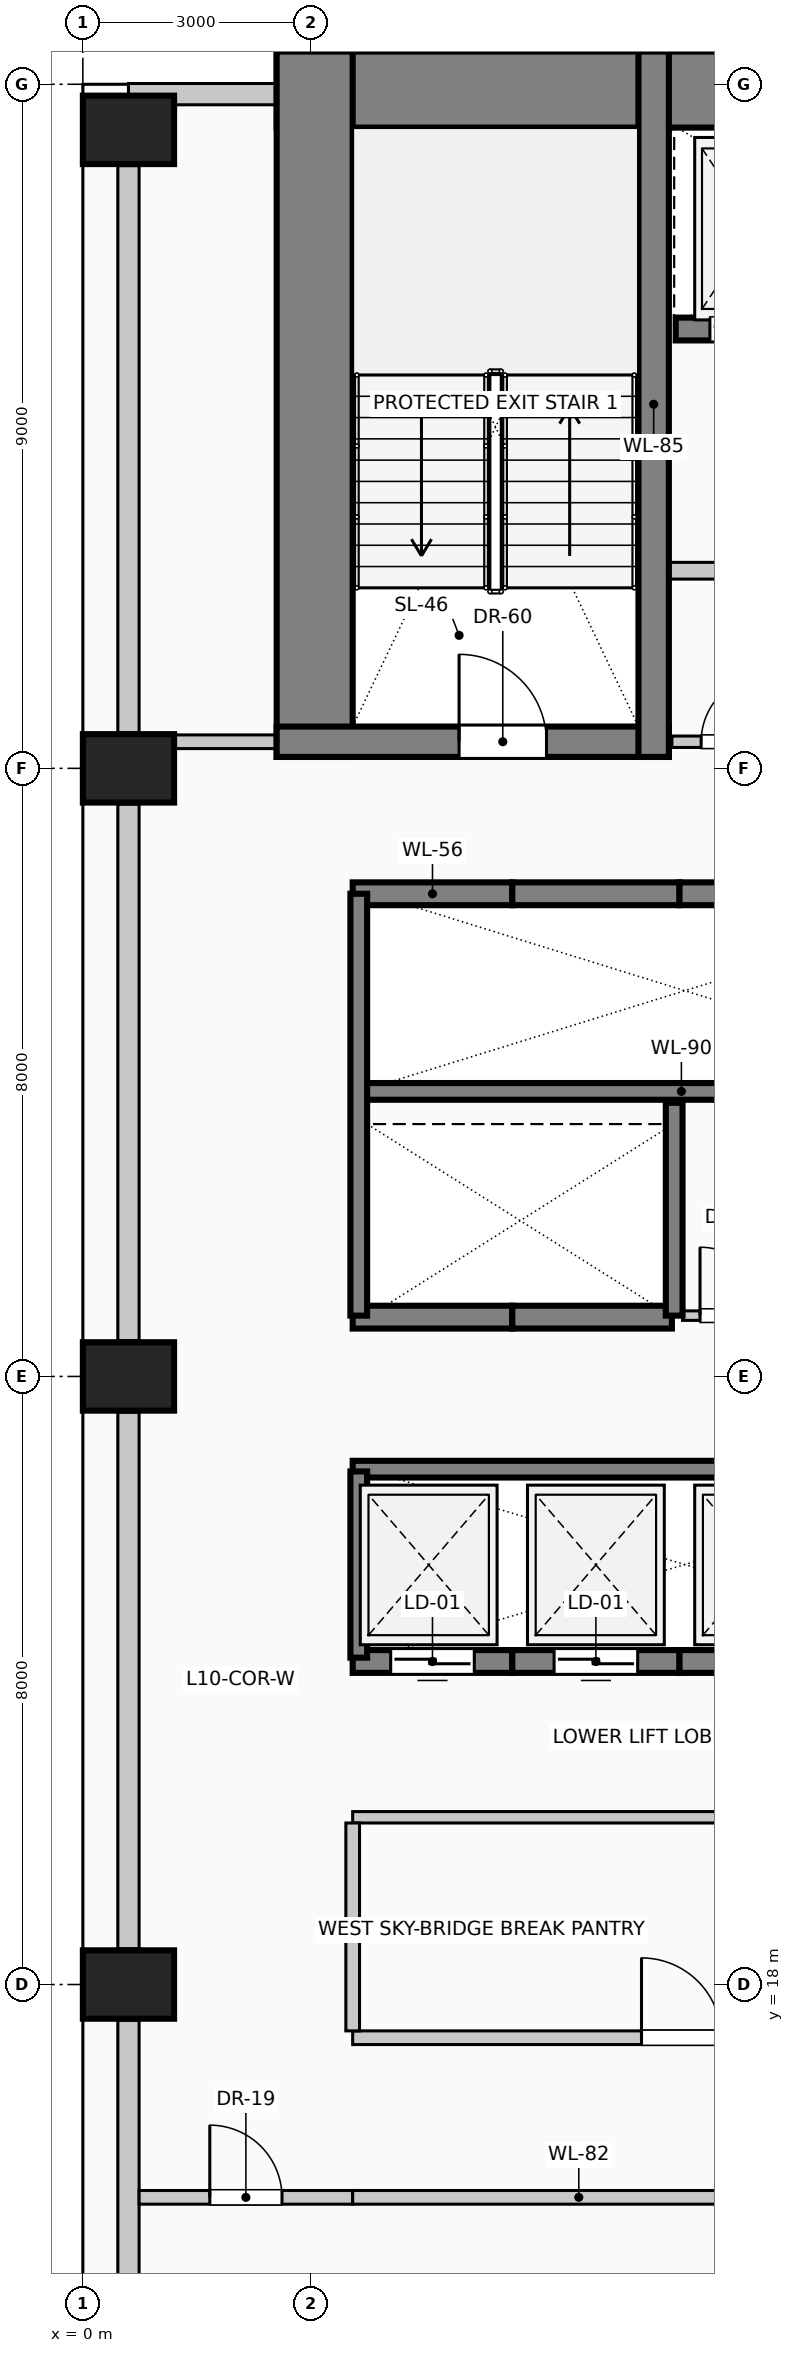
"""IFC4 building model, lengths in metres.
Left out: names, types, materials, properties, quantities, classifications, styles, units other than length and angle.
Written with IfcOpenShell. Run it as: python <this file> out.ifc"""

import sys

from ifc_helpers import new_model, si_unit, direction, frame, frame_2d, origin, origin_2d, place, context, subcontext, project, spatial, rectangle, extrude, element, fill, save


model = new_model("IFC4")
c1 = context("Model", 3, precision=1e-05, world=origin(), true_north=direction((0.0, 1.0)))
c2 = subcontext(c1, "Body", "Model", "MODEL_VIEW")
j1 = project(units=[si_unit("LENGTHUNIT", "METRE"), si_unit("PLANEANGLEUNIT", "RADIAN")], contexts=[c1])
p1 = place(None, origin())
s1 = spatial("IfcSite", under=j1, at=p1, CompositionType="ELEMENT")
p2 = place(p1, origin())
s2 = spatial("IfcBuilding", under=s1, at=p2, CompositionType="ELEMENT")
p3 = place(p2, frame((0.0, 0.0, 42.6)))
s3 = spatial("IfcBuildingStorey", under=s2, at=p3, CompositionType="ELEMENT", Elevation=42.6)
p4 = place(p3, frame((2.55, 42.93, 0.0), z_axis=(0.0, 0.0, 1.0), x_axis=(1.0, 0.0, 0.0)))
e1 = element("IfcWall", 1, at=p4, inside=s3, PredefinedType="SHEAR", context=c2, shape_type="SweptSolid", body=[
    extrude(rectangle(XDim=14.9, YDim=1.0, at=frame_2d((7.45, 0.0))), origin(), (0.0, 0.0, 1.0), 4.0),
])
p5 = place(p3, frame((3.05, 34.15, 0.0), z_axis=(0.0, 0.0, 1.0), x_axis=(0.0, 1.0, 0.0)))
e2 = element("IfcWall", 2, at=p5, inside=s3, PredefinedType="SHEAR", context=c2, shape_type="SweptSolid", body=[
    extrude(rectangle(XDim=9.28, YDim=1.0, at=frame_2d((4.64, 0.0))), origin(), (0.0, 0.0, 1.0), 4.0),
])
p6 = place(p3, frame((2.55, 34.35, 0.0), z_axis=(0.0, 0.0, 1.0), x_axis=(1.0, 0.0, 0.0)))
e3 = element("IfcWall", 3, at=p6, inside=s3, PredefinedType="SHEAR", context=c2, shape_type="SweptSolid", body=[
    extrude(rectangle(XDim=5.16, YDim=0.4, at=frame_2d((2.58, 0.0))), origin(), (0.0, 0.0, 1.0), 4.0),
])
p7 = place(p6, frame((2.4, 0.0, 0.0)))
e4 = element("IfcOpeningElement", 4, at=p7, cuts=e3, PredefinedType="OPENING", context=c2, shape_type="SweptSolid", body=[
    extrude(rectangle(XDim=1.15, YDim=2.2, at=frame_2d((0.575, 1.1))), frame((0.0, 0.21, 0.0), z_axis=(0.0, -1.0, 0.0), x_axis=(1.0, 0.0, 0.0)), (0.0, 0.0, 1.0), 0.42),
])
p8 = place(p3, frame((7.51, 34.15, 0.0), z_axis=(0.0, 0.0, 1.0), x_axis=(0.0, 1.0, 0.0)))
e5 = element("IfcWall", 5, at=p8, inside=s3, PredefinedType="SHEAR", context=c2, shape_type="SweptSolid", body=[
    extrude(rectangle(XDim=9.28, YDim=0.4, at=frame_2d((4.64, 0.0))), origin(), (0.0, 0.0, 1.0), 4.0),
])
for number, where, z_axis, x_axis in (
    (6, (0.6, 18.0, 0.0), (0.0, 0.0, 1.0), (0.0, 1.0, 0.0)),
    (7, (0.6, 26.0, 0.0), (0.0, 0.0, 1.0), (0.0, 1.0, 0.0)),
    (8, (0.6, 34.0, 0.0), (0.0, 0.0, 1.0), (0.0, 1.0, 0.0)),
    (9, (0.6, 42.4, 0.0), (0.0, 0.0, 1.0), (0.0, 1.0, 0.0)),
):
    element("IfcColumn", number, at=place(p3, frame(where, z_axis=z_axis, x_axis=x_axis)), inside=s3, PredefinedType="COLUMN", context=c2, shape_type="SweptSolid", body=[
        extrude(rectangle(XDim=0.9, YDim=1.2, at=origin_2d()), origin(), (0.0, 0.0, 1.0), 4.0),
    ])
for number, where, z_axis, x_axis in (
    (10, (0.6, 10.47, 0.0), (0.0, 0.0, 1.0), (0.0, 1.0, 0.0)),
    (11, (0.6, 18.47, 0.0), (0.0, 0.0, 1.0), (0.0, 1.0, 0.0)),
    (12, (0.6, 26.47, 0.0), (0.0, 0.0, 1.0), (0.0, 1.0, 0.0)),
):
    element("IfcWall", number, at=place(p3, frame(where, z_axis=z_axis, x_axis=x_axis)), inside=s3, PredefinedType="SOLIDWALL", context=c2, shape_type="SweptSolid", body=[
        extrude(rectangle(XDim=7.06, YDim=0.28, at=frame_2d((3.53, 0.0))), origin(), (0.0, 0.0, 1.0), 2.85),
    ])
p9 = place(p3, frame((0.6, 34.47, 0.0), z_axis=(0.0, 0.0, 1.0), x_axis=(0.0, 1.0, 0.0)))
e13 = element("IfcWall", 13, at=p9, inside=s3, PredefinedType="SOLIDWALL", context=c2, shape_type="SweptSolid", body=[
    extrude(rectangle(XDim=7.46, YDim=0.28, at=frame_2d((3.73, 0.0))), origin(), (0.0, 0.0, 1.0), 2.85),
])
p10 = place(p3, frame((0.6, 42.87, 0.0), z_axis=(0.0, 0.0, 1.0), x_axis=(1.0, 0.0, 0.0)))
e14 = element("IfcWall", 14, at=p10, inside=s3, PredefinedType="SOLIDWALL", context=c2, shape_type="SweptSolid", body=[
    extrude(rectangle(XDim=1.945, YDim=0.28, at=frame_2d((0.972, 0.0))), origin(), (0.0, 0.0, 1.0), 3.7),
])
p11 = place(p3, frame((5.65, 22.25, 0.0), z_axis=(0.0, 0.0, 1.0), x_axis=(-1.0, 0.0, 0.0)))
e15 = element("IfcWall", 15, at=p11, inside=s3, PredefinedType="SOLIDWALL", context=c2, shape_type="SweptSolid", body=[
    extrude(rectangle(XDim=2.1, YDim=0.3, at=frame_2d((1.05, 0.0))), origin(), (0.0, 0.0, 1.0), 4.0),
])
p12 = place(p11, frame((0.5, 0.0, 0.0)))
e16 = element("IfcOpeningElement", 16, at=p12, cuts=e15, PredefinedType="OPENING", context=c2, shape_type="SweptSolid", body=[
    extrude(rectangle(XDim=1.1, YDim=2.2, at=frame_2d((0.55, 1.1))), frame((0.0, 0.16, 0.0), z_axis=(0.0, -1.0, 0.0), x_axis=(1.0, 0.0, 0.0)), (0.0, 0.0, 1.0), 0.32),
])
p13 = place(p3, frame((7.85, 22.25, 0.0), z_axis=(0.0, 0.0, 1.0), x_axis=(-1.0, 0.0, 0.0)))
e17 = element("IfcWall", 17, at=p13, inside=s3, PredefinedType="SOLIDWALL", context=c2, shape_type="SweptSolid", body=[
    extrude(rectangle(XDim=2.2, YDim=0.3, at=frame_2d((1.1, 0.0))), origin(), (0.0, 0.0, 1.0), 4.0),
])
p14 = place(p13, frame((0.55, 0.0, 0.0)))
e18 = element("IfcOpeningElement", 18, at=p14, cuts=e17, PredefinedType="OPENING", context=c2, shape_type="SweptSolid", body=[
    extrude(rectangle(XDim=1.1, YDim=2.2, at=frame_2d((0.55, 1.1))), frame((0.0, 0.16, 0.0), z_axis=(0.0, -1.0, 0.0), x_axis=(1.0, 0.0, 0.0)), (0.0, 0.0, 1.0), 0.32),
])
p15 = place(p3, frame((10.05, 22.25, 0.0), z_axis=(0.0, 0.0, 1.0), x_axis=(-1.0, 0.0, 0.0)))
e19 = element("IfcWall", 19, at=p15, inside=s3, PredefinedType="SOLIDWALL", context=c2, shape_type="SweptSolid", body=[
    extrude(rectangle(XDim=2.2, YDim=0.3, at=frame_2d((1.1, 0.0))), origin(), (0.0, 0.0, 1.0), 4.0),
])
p16 = place(p15, frame((0.55, 0.0, 0.0)))
e20 = element("IfcOpeningElement", 20, at=p16, cuts=e19, PredefinedType="OPENING", context=c2, shape_type="SweptSolid", body=[
    extrude(rectangle(XDim=1.1, YDim=2.2, at=frame_2d((0.55, 1.1))), frame((0.0, 0.16, 0.0), z_axis=(0.0, -1.0, 0.0), x_axis=(1.0, 0.0, 0.0)), (0.0, 0.0, 1.0), 0.32),
])
p17 = place(p3, frame((3.55, 32.35, 0.0), z_axis=(0.0, 0.0, 1.0), x_axis=(1.0, 0.0, 0.0)))
e21 = element("IfcWall", 21, at=p17, inside=s3, PredefinedType="SOLIDWALL", context=c2, shape_type="SweptSolid", body=[
    extrude(rectangle(XDim=2.1, YDim=0.3, at=frame_2d((1.05, 0.0))), origin(), (0.0, 0.0, 1.0), 4.0),
])
p18 = place(p3, frame((5.65, 32.35, 0.0), z_axis=(0.0, 0.0, 1.0), x_axis=(1.0, 0.0, 0.0)))
e22 = element("IfcWall", 22, at=p18, inside=s3, PredefinedType="SOLIDWALL", context=c2, shape_type="SweptSolid", body=[
    extrude(rectangle(XDim=2.2, YDim=0.3, at=frame_2d((1.1, 0.0))), origin(), (0.0, 0.0, 1.0), 4.0),
])
p19 = place(p3, frame((7.85, 32.35, 0.0), z_axis=(0.0, 0.0, 1.0), x_axis=(1.0, 0.0, 0.0)))
e23 = element("IfcWall", 23, at=p19, inside=s3, PredefinedType="SOLIDWALL", context=c2, shape_type="SweptSolid", body=[
    extrude(rectangle(XDim=2.2, YDim=0.3, at=frame_2d((1.1, 0.0))), origin(), (0.0, 0.0, 1.0), 4.0),
])
p20 = place(p3, frame((5.65, 26.78, 0.0), z_axis=(0.0, 0.0, 1.0), x_axis=(-1.0, 0.0, 0.0)))
e24 = element("IfcWall", 24, at=p20, inside=s3, PredefinedType="SOLIDWALL", context=c2, shape_type="SweptSolid", body=[
    extrude(rectangle(XDim=2.1, YDim=0.3, at=frame_2d((1.05, 0.0))), origin(), (0.0, 0.0, 1.0), 4.0),
])
p21 = place(p3, frame((7.75, 26.78, 0.0), z_axis=(0.0, 0.0, 1.0), x_axis=(-1.0, 0.0, 0.0)))
e25 = element("IfcWall", 25, at=p21, inside=s3, PredefinedType="SOLIDWALL", context=c2, shape_type="SweptSolid", body=[
    extrude(rectangle(XDim=2.1, YDim=0.3, at=frame_2d((1.05, 0.0))), origin(), (0.0, 0.0, 1.0), 4.0),
])
p22 = place(p3, frame((10.0, 39.78, 0.0), z_axis=(0.0, 0.0, 1.0), x_axis=(-1.0, 0.0, 0.0)))
e26 = element("IfcWall", 26, at=p22, inside=s3, PredefinedType="SOLIDWALL", context=c2, shape_type="SweptSolid", body=[
    extrude(rectangle(XDim=2.2, YDim=0.3, at=frame_2d((1.1, 0.0))), origin(), (0.0, 0.0, 1.0), 4.0),
])
p23 = place(p22, frame((0.45, 0.0, 0.0)))
e27 = element("IfcOpeningElement", 27, at=p23, cuts=e26, PredefinedType="OPENING", context=c2, shape_type="SweptSolid", body=[
    extrude(rectangle(XDim=1.3, YDim=2.25, at=frame_2d((0.65, 1.125))), frame((0.0, 0.16, 0.0), z_axis=(0.0, -1.0, 0.0), x_axis=(1.0, 0.0, 0.0)), (0.0, 0.0, 1.0), 0.32),
])
p24 = place(p3, frame((3.55, 29.75, 0.0), z_axis=(0.0, 0.0, 1.0), x_axis=(1.0, 0.0, 0.0)))
e28 = element("IfcWall", 28, at=p24, inside=s3, PredefinedType="SOLIDWALL", context=c2, shape_type="SweptSolid", body=[
    extrude(rectangle(XDim=8.65, YDim=0.22, at=frame_2d((4.325, 0.0))), origin(), (0.0, 0.0, 1.0), 4.0),
])
p25 = place(p3, frame((3.63, 26.8, 0.0), z_axis=(0.0, 0.0, 1.0), x_axis=(0.0, 1.0, 0.0)))
e29 = element("IfcWall", 29, at=p25, inside=s3, PredefinedType="SOLIDWALL", context=c2, shape_type="SweptSolid", body=[
    extrude(rectangle(XDim=5.55, YDim=0.22, at=frame_2d((2.775, 0.0))), origin(), (0.0, 0.0, 1.0), 4.0),
])
p26 = place(p3, frame((7.78, 26.8, 0.0), z_axis=(0.0, 0.0, 1.0), x_axis=(0.0, 1.0, 0.0)))
e30 = element("IfcWall", 30, at=p26, inside=s3, PredefinedType="SOLIDWALL", context=c2, shape_type="SweptSolid", body=[
    extrude(rectangle(XDim=2.8, YDim=0.22, at=frame_2d((1.4, 0.0))), origin(), (0.0, 0.0, 1.0), 4.0),
])
p27 = place(p3, frame((3.55, 24.78, 0.0), z_axis=(0.0, 0.0, 1.0), x_axis=(1.0, 0.0, 0.0)))
e31 = element("IfcWall", 31, at=p27, inside=s3, PredefinedType="SOLIDWALL", context=c2, shape_type="SweptSolid", body=[
    extrude(rectangle(XDim=8.65, YDim=0.22, at=frame_2d((4.325, 0.0))), origin(), (0.0, 0.0, 1.0), 4.0),
])
p28 = place(p3, frame((3.63, 22.3, 0.0), z_axis=(0.0, 0.0, 1.0), x_axis=(0.0, 1.0, 0.0)))
e32 = element("IfcWall", 32, at=p28, inside=s3, PredefinedType="SOLIDWALL", context=c2, shape_type="SweptSolid", body=[
    extrude(rectangle(XDim=2.45, YDim=0.22, at=frame_2d((1.225, 0.0))), origin(), (0.0, 0.0, 1.0), 4.0),
])
p29 = place(p3, frame((7.51, 36.6, 0.0), z_axis=(0.0, 0.0, 1.0), x_axis=(1.0, 0.0, 0.0)))
e33 = element("IfcWall", 33, at=p29, inside=s3, PredefinedType="PARTITIONING", context=c2, shape_type="SweptSolid", body=[
    extrude(rectangle(XDim=4.98, YDim=0.22, at=frame_2d((2.49, 0.0))), origin(), (0.0, 0.0, 1.0), 3.7),
])
p30 = place(p29, frame((1.94, 0.0, 0.0)))
e34 = element("IfcOpeningElement", 34, at=p30, cuts=e33, PredefinedType="OPENING", context=c2, shape_type="SweptSolid", body=[
    extrude(rectangle(XDim=1.1, YDim=2.2, at=frame_2d((0.55, 1.1))), frame((0.0, 0.12, 0.0), z_axis=(0.0, -1.0, 0.0), x_axis=(1.0, 0.0, 0.0)), (0.0, 0.0, 1.0), 0.24),
])
p31 = place(p3, frame((0.74, 15.2, 0.0), z_axis=(0.0, 0.0, 1.0), x_axis=(1.0, 0.0, 0.0)))
e35 = element("IfcWall", 35, at=p31, inside=s3, PredefinedType="PARTITIONING", context=c2, shape_type="SweptSolid", body=[
    extrude(rectangle(XDim=2.81, YDim=0.18, at=frame_2d((1.405, 0.0))), origin(), (0.0, 0.0, 1.0), 3.7),
])
p32 = place(p31, frame((0.93, 0.0, 0.0)))
e36 = element("IfcOpeningElement", 36, at=p32, cuts=e35, PredefinedType="OPENING", context=c2, shape_type="SweptSolid", body=[
    extrude(rectangle(XDim=0.95, YDim=2.15, at=frame_2d((0.475, 1.075))), frame((0.0, 0.1, 0.0), z_axis=(0.0, -1.0, 0.0), x_axis=(1.0, 0.0, 0.0)), (0.0, 0.0, 1.0), 0.2),
])
p33 = place(p3, frame((3.55, 15.2, 0.0), z_axis=(0.0, 0.0, 1.0), x_axis=(1.0, 0.0, 0.0)))
e37 = element("IfcWall", 37, at=p33, inside=s3, PredefinedType="PARTITIONING", context=c2, shape_type="SweptSolid", body=[
    extrude(rectangle(XDim=5.95, YDim=0.18, at=frame_2d((2.975, 0.0))), origin(), (0.0, 0.0, 1.0), 3.7),
])
p34 = place(p3, frame((3.55, 17.3, 0.0), z_axis=(0.0, 0.0, 1.0), x_axis=(1.0, 0.0, 0.0)))
e38 = element("IfcWall", 38, at=p34, inside=s3, PredefinedType="PARTITIONING", context=c2, shape_type="SweptSolid", body=[
    extrude(rectangle(XDim=8.65, YDim=0.18, at=frame_2d((4.325, 0.0))), origin(), (0.0, 0.0, 1.0), 3.7),
])
p35 = place(p34, frame((3.8, 0.0, 0.0)))
e39 = element("IfcOpeningElement", 39, at=p35, cuts=e38, PredefinedType="OPENING", context=c2, shape_type="SweptSolid", body=[
    extrude(rectangle(XDim=1.05, YDim=2.15, at=frame_2d((0.525, 1.075))), frame((0.0, 0.1, 0.0), z_axis=(0.0, -1.0, 0.0), x_axis=(1.0, 0.0, 0.0)), (0.0, 0.0, 1.0), 0.2),
])
p36 = place(p3, frame((3.55, 20.2, 0.0), z_axis=(0.0, 0.0, 1.0), x_axis=(1.0, 0.0, 0.0)))
e40 = element("IfcWall", 40, at=p36, inside=s3, PredefinedType="PARTITIONING", context=c2, shape_type="SweptSolid", body=[
    extrude(rectangle(XDim=8.65, YDim=0.15, at=frame_2d((4.325, 0.0))), origin(), (0.0, 0.0, 1.0), 3.7),
])
p37 = place(p3, frame((7.89, 26.8, 0.0), z_axis=(0.0, 0.0, 1.0), x_axis=(1.0, 0.0, 0.0)))
e41 = element("IfcWall", 41, at=p37, inside=s3, PredefinedType="PARTITIONING", context=c2, shape_type="SweptSolid", body=[
    extrude(rectangle(XDim=1.36, YDim=0.125, at=frame_2d((0.68, 0.0))), origin(), (0.0, 0.0, 1.0), 3.7),
])
p38 = place(p37, frame((0.23, 0.0, 0.0)))
e42 = element("IfcOpeningElement", 42, at=p38, cuts=e41, PredefinedType="OPENING", context=c2, shape_type="SweptSolid", body=[
    extrude(rectangle(XDim=0.9, YDim=2.1, at=frame_2d((0.45, 1.05))), frame((0.0, 0.073, 0.0), z_axis=(0.0, -1.0, 0.0), x_axis=(1.0, 0.0, 0.0)), (0.0, 0.0, 1.0), 0.145),
])
p39 = place(p3, frame((1.2, 34.35, 0.0), z_axis=(0.0, 0.0, 1.0), x_axis=(1.0, 0.0, 0.0)))
e43 = element("IfcWall", 43, at=p39, inside=s3, PredefinedType="PARTITIONING", context=c2, shape_type="SweptSolid", body=[
    extrude(rectangle(XDim=1.35, YDim=0.18, at=frame_2d((0.675, 0.0))), origin(), (0.0, 0.0, 1.0), 3.7),
])
p40 = place(p3, frame((7.75, 34.35, 0.0), z_axis=(0.0, 0.0, 1.0), x_axis=(1.0, 0.0, 0.0)))
e44 = element("IfcWall", 44, at=p40, inside=s3, PredefinedType="PARTITIONING", context=c2, shape_type="SweptSolid", body=[
    extrude(rectangle(XDim=1.65, YDim=0.15, at=frame_2d((0.825, 0.0))), origin(), (0.0, 0.0, 1.0), 3.7),
])
p41 = place(p40, frame((0.385, 0.0, 0.0)))
e45 = element("IfcOpeningElement", 45, at=p41, cuts=e44, PredefinedType="OPENING", context=c2, shape_type="SweptSolid", body=[
    extrude(rectangle(XDim=0.88, YDim=2.1, at=frame_2d((0.44, 1.05))), frame((0.0, 0.085, 0.0), z_axis=(0.0, -1.0, 0.0), x_axis=(1.0, 0.0, 0.0)), (0.0, 0.0, 1.0), 0.17),
])
p42 = place(p3, frame((3.55, 17.39, 0.0), z_axis=(0.0, 0.0, 1.0), x_axis=(0.0, 1.0, 0.0)))
e46 = element("IfcWall", 46, at=p42, inside=s3, PredefinedType="PARTITIONING", context=c2, shape_type="SweptSolid", body=[
    extrude(rectangle(XDim=2.735, YDim=0.18, at=frame_2d((1.368, 0.0))), origin(), (0.0, 0.0, 1.0), 3.7),
])
p43 = place(p12, origin())
e47 = element("IfcDoor", 47, at=p43, inside=s3, OperationType="SLIDING_TO_LEFT", PredefinedType="DOOR", context=c2, shape_type="SweptSolid", body=[
    extrude(rectangle(XDim=1.1, YDim=2.2, at=frame_2d((0.55, 1.1))), frame((0.0, 0.025, 0.0), z_axis=(0.0, -1.0, 0.0), x_axis=(1.0, 0.0, 0.0)), (0.0, 0.0, 1.0), 0.05),
])
fill(e16, e47)
p44 = place(p14, origin())
e48 = element("IfcDoor", 48, at=p44, inside=s3, OperationType="SLIDING_TO_RIGHT", PredefinedType="DOOR", context=c2, shape_type="SweptSolid", body=[
    extrude(rectangle(XDim=1.1, YDim=2.2, at=frame_2d((0.55, 1.1))), frame((0.0, 0.025, 0.0), z_axis=(0.0, -1.0, 0.0), x_axis=(1.0, 0.0, 0.0)), (0.0, 0.0, 1.0), 0.05),
])
fill(e18, e48)
p45 = place(p23, origin())
e49 = element("IfcDoor", 49, at=p45, inside=s3, OperationType="SLIDING_TO_LEFT", PredefinedType="DOOR", context=c2, shape_type="SweptSolid", body=[
    extrude(rectangle(XDim=1.3, YDim=2.25, at=frame_2d((0.65, 1.125))), frame((0.0, 0.025, 0.0), z_axis=(0.0, -1.0, 0.0), x_axis=(1.0, 0.0, 0.0)), (0.0, 0.0, 1.0), 0.05),
])
fill(e27, e49)
p46 = place(p7, origin())
e50 = element("IfcDoor", 50, at=p46, inside=s3, OperationType="SINGLE_SWING_LEFT", PredefinedType="DOOR", context=c2, shape_type="SweptSolid", body=[
    extrude(rectangle(XDim=1.15, YDim=2.2, at=frame_2d((0.575, 1.1))), frame((0.0, 0.025, 0.0), z_axis=(0.0, -1.0, 0.0), x_axis=(1.0, 0.0, 0.0)), (0.0, 0.0, 1.0), 0.05),
])
fill(e4, e50)
p47 = place(p32, origin())
e51 = element("IfcDoor", 51, at=p47, inside=s3, OperationType="SINGLE_SWING_LEFT", PredefinedType="DOOR", context=c2, shape_type="SweptSolid", body=[
    extrude(rectangle(XDim=0.95, YDim=2.15, at=frame_2d((0.475, 1.075))), frame((0.0, 0.025, 0.0), z_axis=(0.0, -1.0, 0.0), x_axis=(1.0, 0.0, 0.0)), (0.0, 0.0, 1.0), 0.05),
])
fill(e36, e51)
p48 = place(p35, origin())
e52 = element("IfcDoor", 52, at=p48, inside=s3, OperationType="SINGLE_SWING_LEFT", PredefinedType="DOOR", context=c2, shape_type="SweptSolid", body=[
    extrude(rectangle(XDim=1.05, YDim=2.15, at=frame_2d((0.525, 1.075))), frame((0.0, 0.025, 0.0), z_axis=(0.0, -1.0, 0.0), x_axis=(1.0, 0.0, 0.0)), (0.0, 0.0, 1.0), 0.05),
])
fill(e39, e52)
p49 = place(p38, origin())
e53 = element("IfcDoor", 53, at=p49, inside=s3, OperationType="SINGLE_SWING_LEFT", PredefinedType="DOOR", context=c2, shape_type="SweptSolid", body=[
    extrude(rectangle(XDim=0.9, YDim=2.1, at=frame_2d((0.45, 1.05))), frame((0.0, 0.025, 0.0), z_axis=(0.0, -1.0, 0.0), x_axis=(1.0, 0.0, 0.0)), (0.0, 0.0, 1.0), 0.05),
])
fill(e42, e53)
p50 = place(p41, origin())
e54 = element("IfcDoor", 54, at=p50, inside=s3, OperationType="SINGLE_SWING_RIGHT", PredefinedType="DOOR", context=c2, shape_type="SweptSolid", body=[
    extrude(rectangle(XDim=0.88, YDim=2.1, at=frame_2d((0.44, 1.05))), frame((0.0, 0.025, 0.0), z_axis=(0.0, -1.0, 0.0), x_axis=(1.0, 0.0, 0.0)), (0.0, 0.0, 1.0), 0.05),
])
fill(e45, e54)
save(model, sys.argv[1])
